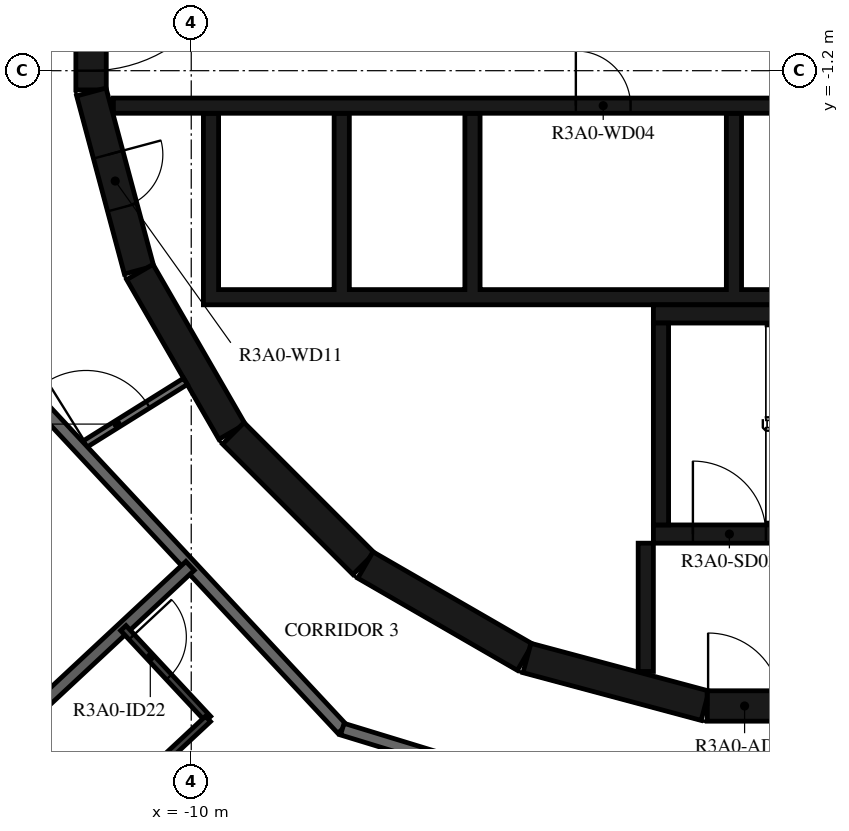
"""IFC4 building model, lengths in metres.
Left out: names, types, materials, properties, quantities, classifications, styles, units other than length and angle.
Written with IfcOpenShell. Run it as: python <this file> out.ifc"""

import sys

from ifc_helpers import new_model, si_unit, direction, frame, frame_2d, origin, place, context, subcontext, project, spatial, polyline, rectangle, outline, extrude, element, fill, save


model = new_model("IFC4")
c1 = context("Model", 3, precision=1e-05, world=origin(), true_north=direction((0.0, 1.0)))
c2 = subcontext(c1, "Body", "Model", "MODEL_VIEW")
j1 = project(units=[si_unit("LENGTHUNIT", "METRE"), si_unit("PLANEANGLEUNIT", "RADIAN")], contexts=[c1])
p1 = place(None, origin())
s1 = spatial("IfcSite", under=j1, at=p1, CompositionType="ELEMENT")
p2 = place(p1, origin())
s2 = spatial("IfcBuilding", under=s1, at=p2, CompositionType="ELEMENT")
p3 = place(p2, frame((0.0, 0.0, 120.4)))
s3 = spatial("IfcBuildingStorey", under=s2, at=p3, CompositionType="ELEMENT", Elevation=120.4)
p4 = place(p3, frame((-11.647, 1.516, 0.0), z_axis=(0.0, 0.0, 1.0), x_axis=(0.0, -1.0, 0.0)))
e1 = element("IfcWall", 1, at=p4, inside=s3, PredefinedType="SHEAR", context=c2, shape_type="SweptSolid", body=[
    extrude(rectangle(XDim=3.033, YDim=0.5, at=frame_2d((1.516, 0.0))), origin(), (0.0, 0.0, 1.0), 3.12),
])
p5 = place(p4, frame((0.316, 0.0, 0.0)))
e2 = element("IfcOpeningElement", 2, at=p5, cuts=e1, PredefinedType="OPENING", context=c2, shape_type="SweptSolid", body=[
    extrude(rectangle(XDim=2.4, YDim=2.1, at=frame_2d((1.2, 1.05))), frame((0.0, 0.26, 0.0), z_axis=(0.0, -1.0, 0.0), x_axis=(1.0, 0.0, 0.0)), (0.0, 0.0, 1.0), 0.52),
])
p6 = place(p3, frame((-11.643, -1.55, 0.0), z_axis=(0.0, 0.0, 1.0), x_axis=(0.258734743916, -0.965948410781, 0.0)))
e3 = element("IfcWall", 3, at=p6, inside=s3, PredefinedType="SHEAR", context=c2, shape_type="SweptSolid", body=[
    extrude(rectangle(XDim=3.033, YDim=0.5, at=frame_2d((1.516, 0.0))), origin(), (0.0, 0.0, 1.0), 3.12),
])
p7 = place(p6, frame((1.066, 0.0, 0.0)))
e4 = element("IfcOpeningElement", 4, at=p7, cuts=e3, PredefinedType="OPENING", context=c2, shape_type="SweptSolid", body=[
    extrude(rectangle(XDim=0.9, YDim=2.1, at=frame_2d((0.45, 1.05))), frame((0.0, 0.26, 0.0), z_axis=(0.0, -1.0, 0.0), x_axis=(1.0, 0.0, 0.0)), (0.0, 0.0, 1.0), 0.52),
])
p8 = place(p3, frame((-10.845, -4.51, 0.0), z_axis=(0.0, 0.0, 1.0), x_axis=(0.500087131594, -0.865975092491, 0.0)))
e5 = element("IfcWall", 5, at=p8, inside=s3, PredefinedType="SHEAR", context=c2, shape_type="SweptSolid", body=[
    extrude(rectangle(XDim=3.033, YDim=0.5, at=frame_2d((1.516, 0.0))), origin(), (0.0, 0.0, 1.0), 3.12),
])
p9 = place(p3, frame((-9.308, -7.164, 0.0), z_axis=(0.0, 0.0, 1.0), x_axis=(0.707106781187, -0.707106781187, 0.0)))
e6 = element("IfcWall", 6, at=p9, inside=s3, PredefinedType="SHEAR", context=c2, shape_type="SweptSolid", body=[
    extrude(rectangle(XDim=3.032, YDim=0.5, at=frame_2d((1.516, 0.0))), origin(), (0.0, 0.0, 1.0), 3.12),
])
for number, where, z_axis, x_axis in (
    (7, (-7.137, -9.329, 0.0), (0.0, 0.0, 1.0), (0.866, -0.5, 0.0)),
    (8, (-4.479, -10.858, 0.0), (0.0, 0.0, 1.0), (0.966, -0.259, 0.0)),
):
    element("IfcWall", number, at=place(p3, frame(where, z_axis=z_axis, x_axis=x_axis)), inside=s3, PredefinedType="SHEAR", context=c2, shape_type="SweptSolid", body=[
        extrude(rectangle(XDim=3.033, YDim=0.5, at=frame_2d((1.516, 0.0))), origin(), (0.0, 0.0, 1.0), 3.12),
    ])
p10 = place(p3, frame((-1.516, -11.647, 0.0), z_axis=(0.0, 0.0, 1.0), x_axis=(1.0, 0.0, 0.0)))
e9 = element("IfcWall", 9, at=p10, inside=s3, PredefinedType="SHEAR", context=c2, shape_type="SweptSolid", body=[
    extrude(rectangle(XDim=3.033, YDim=0.5, at=frame_2d((1.516, 0.0))), origin(), (0.0, 0.0, 1.0), 3.12),
])
p11 = place(p10, frame((0.016, 0.0, 0.0)))
e10 = element("IfcOpeningElement", 10, at=p11, cuts=e9, PredefinedType="OPENING", context=c2, shape_type="SweptSolid", body=[
    extrude(rectangle(XDim=1.2, YDim=2.1, at=frame_2d((0.6, 1.05))), frame((0.0, 0.26, 0.0), z_axis=(0.0, -1.0, 0.0), x_axis=(1.0, 0.0, 0.0)), (0.0, 0.0, 1.0), 0.52),
])
p12 = place(p3, frame((-2.275, -8.67, 0.0), z_axis=(0.0, 0.0, 1.0), x_axis=(0.0, 1.0, 0.0)))
e11 = element("IfcWall", 11, at=p12, inside=s3, PredefinedType="SHEAR", context=c2, shape_type="SweptSolid", body=[
    extrude(rectangle(XDim=3.32, YDim=0.25, at=frame_2d((1.66, 0.0))), origin(), (0.0, 0.0, 1.0), 3.12),
])
p13 = place(p3, frame((-2.4, -5.2, 0.0), z_axis=(0.0, 0.0, 1.0), x_axis=(1.0, 0.0, 0.0)))
e12 = element("IfcWall", 12, at=p13, inside=s3, PredefinedType="SHEAR", context=c2, shape_type="SweptSolid", body=[
    extrude(rectangle(XDim=7.05, YDim=0.3, at=frame_2d((3.525, 0.0))), origin(), (0.0, 0.0, 1.0), 3.12),
])
p14 = place(p3, frame((-2.4, -8.82, 0.0), z_axis=(0.0, 0.0, 1.0), x_axis=(1.0, 0.0, 0.0)))
e13 = element("IfcWall", 13, at=p14, inside=s3, PredefinedType="SHEAR", context=c2, shape_type="SweptSolid", body=[
    extrude(rectangle(XDim=2.5, YDim=0.3, at=frame_2d((1.25, 0.0))), origin(), (0.0, 0.0, 1.0), 3.12),
])
p15 = place(p14, frame((0.65, 0.0, 0.0)))
e14 = element("IfcOpeningElement", 14, at=p15, cuts=e13, PredefinedType="OPENING", context=c2, shape_type="SweptSolid", body=[
    extrude(rectangle(XDim=1.2, YDim=2.1, at=frame_2d((0.6, 1.05))), frame((0.0, 0.16, 0.0), z_axis=(0.0, -1.0, 0.0), x_axis=(1.0, 0.0, 0.0)), (0.0, 0.0, 1.0), 0.32),
])
p16 = place(p3, frame((-2.525, -8.97, 0.0), z_axis=(0.0, 0.0, 1.0), x_axis=(0.0, -1.0, 0.0)))
e15 = element("IfcWall", 15, at=p16, inside=s3, PredefinedType="SHEAR", context=c2, shape_type="SweptSolid", body=[
    extrude(rectangle(XDim=2.11, YDim=0.25, at=frame_2d((1.055, 0.0))), origin(), (0.0, 0.0, 1.0), 3.12),
])
p17 = place(p3, origin())
e16 = element("IfcWall", 16, at=p17, inside=s3, PredefinedType="SHEAR", context=c2, shape_type="SweptSolid", body=[
    extrude(outline(polyline([(9.8, -5.05), (9.8, -4.8), (9.8, -1.9), (9.55, -1.9), (9.55, -4.8), (7.65, -4.8), (7.65, -1.9), (7.4, -1.9), (7.4, -4.8), (5.5, -4.8), (5.5, -1.9), (5.25, -1.9), (5.25, -4.8), (3.35, -4.8), (3.35, -1.9), (3.1, -1.9), (3.1, -4.8), (1.2, -4.8), (1.2, -1.9), (0.95, -1.9), (0.95, -4.8), (-0.95, -4.8), (-0.95, -1.9), (-1.2, -1.9), (-1.2, -4.8), (-5.25, -4.8), (-5.25, -1.9), (-5.5, -1.9), (-5.5, -4.8), (-7.4, -4.8), (-7.4, -1.9), (-7.65, -1.9), (-7.65, -4.8), (-9.55, -4.8), (-9.55, -1.9), (-9.8, -1.9), (-9.8, -4.8), (-9.8, -5.05), (9.8, -5.05)])), origin(), (0.0, 0.0, 1.0), 3.12),
])
p18 = place(p3, frame((-11.28, -1.775, 0.0), z_axis=(0.0, 0.0, 1.0), x_axis=(1.0, 0.0, 0.0)))
e17 = element("IfcWall", 17, at=p18, inside=s3, PredefinedType="SHEAR", context=c2, shape_type="SweptSolid", body=[
    extrude(rectangle(XDim=14.38, YDim=0.25, at=frame_2d((7.19, 0.0))), origin(), (0.0, 0.0, 1.0), 3.12),
])
p19 = place(p18, frame((7.605, 0.0, 0.0)))
e18 = element("IfcOpeningElement", 18, at=p19, cuts=e17, PredefinedType="OPENING", context=c2, shape_type="SweptSolid", body=[
    extrude(rectangle(XDim=0.9, YDim=2.1, at=frame_2d((0.45, 1.05))), frame((0.0, 0.135, 0.0), z_axis=(0.0, -1.0, 0.0), x_axis=(1.0, 0.0, 0.0)), (0.0, 0.0, 1.0), 0.27),
])
p20 = place(p18, frame((10.83, 0.0, 0.0)))
e19 = element("IfcOpeningElement", 19, at=p20, cuts=e17, PredefinedType="OPENING", context=c2, shape_type="SweptSolid", body=[
    extrude(rectangle(XDim=0.9, YDim=2.1, at=frame_2d((0.45, 1.05))), frame((0.0, 0.135, 0.0), z_axis=(0.0, -1.0, 0.0), x_axis=(1.0, 0.0, 0.0)), (0.0, 0.0, 1.0), 0.27),
])
p21 = place(p18, frame((12.98, 0.0, 0.0)))
e20 = element("IfcOpeningElement", 20, at=p21, cuts=e17, PredefinedType="OPENING", context=c2, shape_type="SweptSolid", body=[
    extrude(rectangle(XDim=0.9, YDim=2.1, at=frame_2d((0.45, 1.05))), frame((0.0, 0.135, 0.0), z_axis=(0.0, -1.0, 0.0), x_axis=(1.0, 0.0, 0.0)), (0.0, 0.0, 1.0), 0.27),
])
p22 = place(p3, frame((-11.836, -7.396, 0.0), z_axis=(0.0, 0.0, 1.0), x_axis=(0.848071831599, 0.529881277692, 0.0)))
e21 = element("IfcWall", 21, at=p22, inside=s3, PredefinedType="PARTITIONING", context=c2, shape_type="SweptSolid", body=[
    extrude(rectangle(XDim=2.052, YDim=0.12, at=frame_2d((1.026, 0.0))), origin(), (0.0, 0.0, 1.0), 3.12),
])
p23 = place(p22, frame((0.125, 0.0, 0.0)))
e22 = element("IfcOpeningElement", 22, at=p23, cuts=e21, PredefinedType="OPENING", context=c2, shape_type="SweptSolid", body=[
    extrude(rectangle(XDim=1.2, YDim=2.1, at=frame_2d((0.6, 1.05))), frame((0.0, 0.07, 0.0), z_axis=(0.0, -1.0, 0.0), x_axis=(1.0, 0.0, 0.0)), (0.0, 0.0, 1.0), 0.14),
])
p24 = place(p3, frame((-12.523, -6.659, 0.0), z_axis=(0.0, 0.0, 1.0), x_axis=(0.682001841105, -0.731350455479, 0.0)))
e23 = element("IfcWall", 23, at=p24, inside=s3, PredefinedType="STANDARD", context=c2, shape_type="SweptSolid", body=[
    extrude(rectangle(XDim=7.342, YDim=0.2, at=frame_2d((3.671, 0.0))), origin(), (0.0, 0.0, 1.0), 3.12),
])
p25 = place(p3, frame((-7.516, -12.028, 0.0), z_axis=(0.0, 0.0, 1.0), x_axis=(0.956306642771, -0.292365533182, 0.0)))
e24 = element("IfcWall", 24, at=p25, inside=s3, PredefinedType="STANDARD", context=c2, shape_type="SweptSolid", body=[
    extrude(rectangle(XDim=7.342, YDim=0.2, at=frame_2d((3.671, 0.0))), origin(), (0.0, 0.0, 1.0), 3.12),
])
p26 = place(p25, frame((5.745, 0.0, 0.0)))
e25 = element("IfcOpeningElement", 25, at=p26, cuts=e24, PredefinedType="OPENING", context=c2, shape_type="SweptSolid", body=[
    extrude(rectangle(XDim=1.0, YDim=2.1, at=frame_2d((0.5, 1.05))), frame((0.0, 0.11, 0.0), z_axis=(0.0, -1.0, 0.0), x_axis=(1.0, 0.0, 0.0)), (0.0, 0.0, 1.0), 0.22),
])
p27 = place(p3, frame((-13.699, -12.774, 0.0), z_axis=(0.0, 0.0, 1.0), x_axis=(0.731353758457, 0.681998299111, 0.0)))
e26 = element("IfcWall", 26, at=p27, inside=s3, PredefinedType="STANDARD", context=c2, shape_type="SweptSolid", body=[
    extrude(rectangle(XDim=5.031, YDim=0.2, at=frame_2d((2.515, 0.0))), origin(), (0.0, 0.0, 1.0), 3.12),
])
p28 = place(p3, frame((-11.117, -10.366, 0.0), z_axis=(0.0, 0.0, 1.0), x_axis=(0.682041233274, -0.731313719353, 0.0)))
e27 = element("IfcWall", 27, at=p28, inside=s3, PredefinedType="PARTITIONING", context=c2, shape_type="SweptSolid", body=[
    extrude(rectangle(XDim=2.042, YDim=0.12, at=frame_2d((1.021, 0.0))), origin(), (0.0, 0.0, 1.0), 3.12),
])
p29 = place(p28, frame((0.2, 0.0, 0.0)))
e28 = element("IfcOpeningElement", 28, at=p29, cuts=e27, PredefinedType="OPENING", context=c2, shape_type="SweptSolid", body=[
    extrude(rectangle(XDim=0.9, YDim=2.1, at=frame_2d((0.45, 1.05))), frame((0.0, 0.07, 0.0), z_axis=(0.0, -1.0, 0.0), x_axis=(1.0, 0.0, 0.0)), (0.0, 0.0, 1.0), 0.14),
])
p30 = place(p3, frame((-9.724, -11.859, 0.0), z_axis=(0.0, 0.0, 1.0), x_axis=(-0.731365154613, -0.681986078023, 0.0)))
e29 = element("IfcWall", 29, at=p30, inside=s3, PredefinedType="PARTITIONING", context=c2, shape_type="SweptSolid", body=[
    extrude(rectangle(XDim=4.4, YDim=0.12, at=frame_2d((2.2, 0.0))), origin(), (0.0, 0.0, 1.0), 3.12),
])
p31 = place(p15, origin())
e30 = element("IfcDoor", 30, at=p31, inside=s3, OperationType="SINGLE_SWING_LEFT", PredefinedType="DOOR", context=c2, shape_type="SweptSolid", body=[
    extrude(rectangle(XDim=1.2, YDim=2.1, at=frame_2d((0.6, 1.05))), frame((0.0, 0.025, 0.0), z_axis=(0.0, -1.0, 0.0), x_axis=(1.0, 0.0, 0.0)), (0.0, 0.0, 1.0), 0.05),
])
fill(e14, e30)
p32 = place(p11, origin())
e31 = element("IfcDoor", 31, at=p32, inside=s3, OperationType="SINGLE_SWING_RIGHT", PredefinedType="DOOR", context=c2, shape_type="SweptSolid", body=[
    extrude(rectangle(XDim=1.2, YDim=2.1, at=frame_2d((0.6, 1.05))), frame((0.0, 0.025, 0.0), z_axis=(0.0, -1.0, 0.0), x_axis=(1.0, 0.0, 0.0)), (0.0, 0.0, 1.0), 0.05),
])
fill(e10, e31)
p33 = place(p5, origin())
e32 = element("IfcDoor", 32, at=p33, inside=s3, OperationType="DOUBLE_DOOR_SINGLE_SWING", PredefinedType="DOOR", context=c2, shape_type="SweptSolid", body=[
    extrude(rectangle(XDim=2.4, YDim=2.1, at=frame_2d((1.2, 1.05))), frame((0.0, 0.025, 0.0), z_axis=(0.0, -1.0, 0.0), x_axis=(1.0, 0.0, 0.0)), (0.0, 0.0, 1.0), 0.05),
])
fill(e2, e32)
p34 = place(p19, origin())
e33 = element("IfcDoor", 33, at=p34, inside=s3, OperationType="SINGLE_SWING_LEFT", PredefinedType="DOOR", context=c2, shape_type="SweptSolid", body=[
    extrude(rectangle(XDim=0.9, YDim=2.1, at=frame_2d((0.45, 1.05))), frame((0.0, 0.025, 0.0), z_axis=(0.0, -1.0, 0.0), x_axis=(1.0, 0.0, 0.0)), (0.0, 0.0, 1.0), 0.05),
])
fill(e18, e33)
p35 = place(p7, origin())
e34 = element("IfcDoor", 34, at=p35, inside=s3, OperationType="SINGLE_SWING_RIGHT", PredefinedType="DOOR", context=c2, shape_type="SweptSolid", body=[
    extrude(rectangle(XDim=0.9, YDim=2.1, at=frame_2d((0.45, 1.05))), frame((0.0, 0.025, 0.0), z_axis=(0.0, -1.0, 0.0), x_axis=(1.0, 0.0, 0.0)), (0.0, 0.0, 1.0), 0.05),
])
fill(e4, e34)
p36 = place(p29, origin())
e35 = element("IfcDoor", 35, at=p36, inside=s3, OperationType="SINGLE_SWING_LEFT", PredefinedType="DOOR", context=c2, shape_type="SweptSolid", body=[
    extrude(rectangle(XDim=0.9, YDim=2.1, at=frame_2d((0.45, 1.05))), frame((0.0, 0.025, 0.0), z_axis=(0.0, -1.0, 0.0), x_axis=(1.0, 0.0, 0.0)), (0.0, 0.0, 1.0), 0.05),
])
fill(e28, e35)
p37 = place(p23, origin())
e36 = element("IfcDoor", 36, at=p37, inside=s3, OperationType="DOUBLE_DOOR_SINGLE_SWING", PredefinedType="DOOR", context=c2, shape_type="SweptSolid", body=[
    extrude(rectangle(XDim=1.2, YDim=2.1, at=frame_2d((0.6, 1.05))), frame((0.0, 0.025, 0.0), z_axis=(0.0, -1.0, 0.0), x_axis=(1.0, 0.0, 0.0)), (0.0, 0.0, 1.0), 0.05),
])
fill(e22, e36)
save(model, sys.argv[1])
